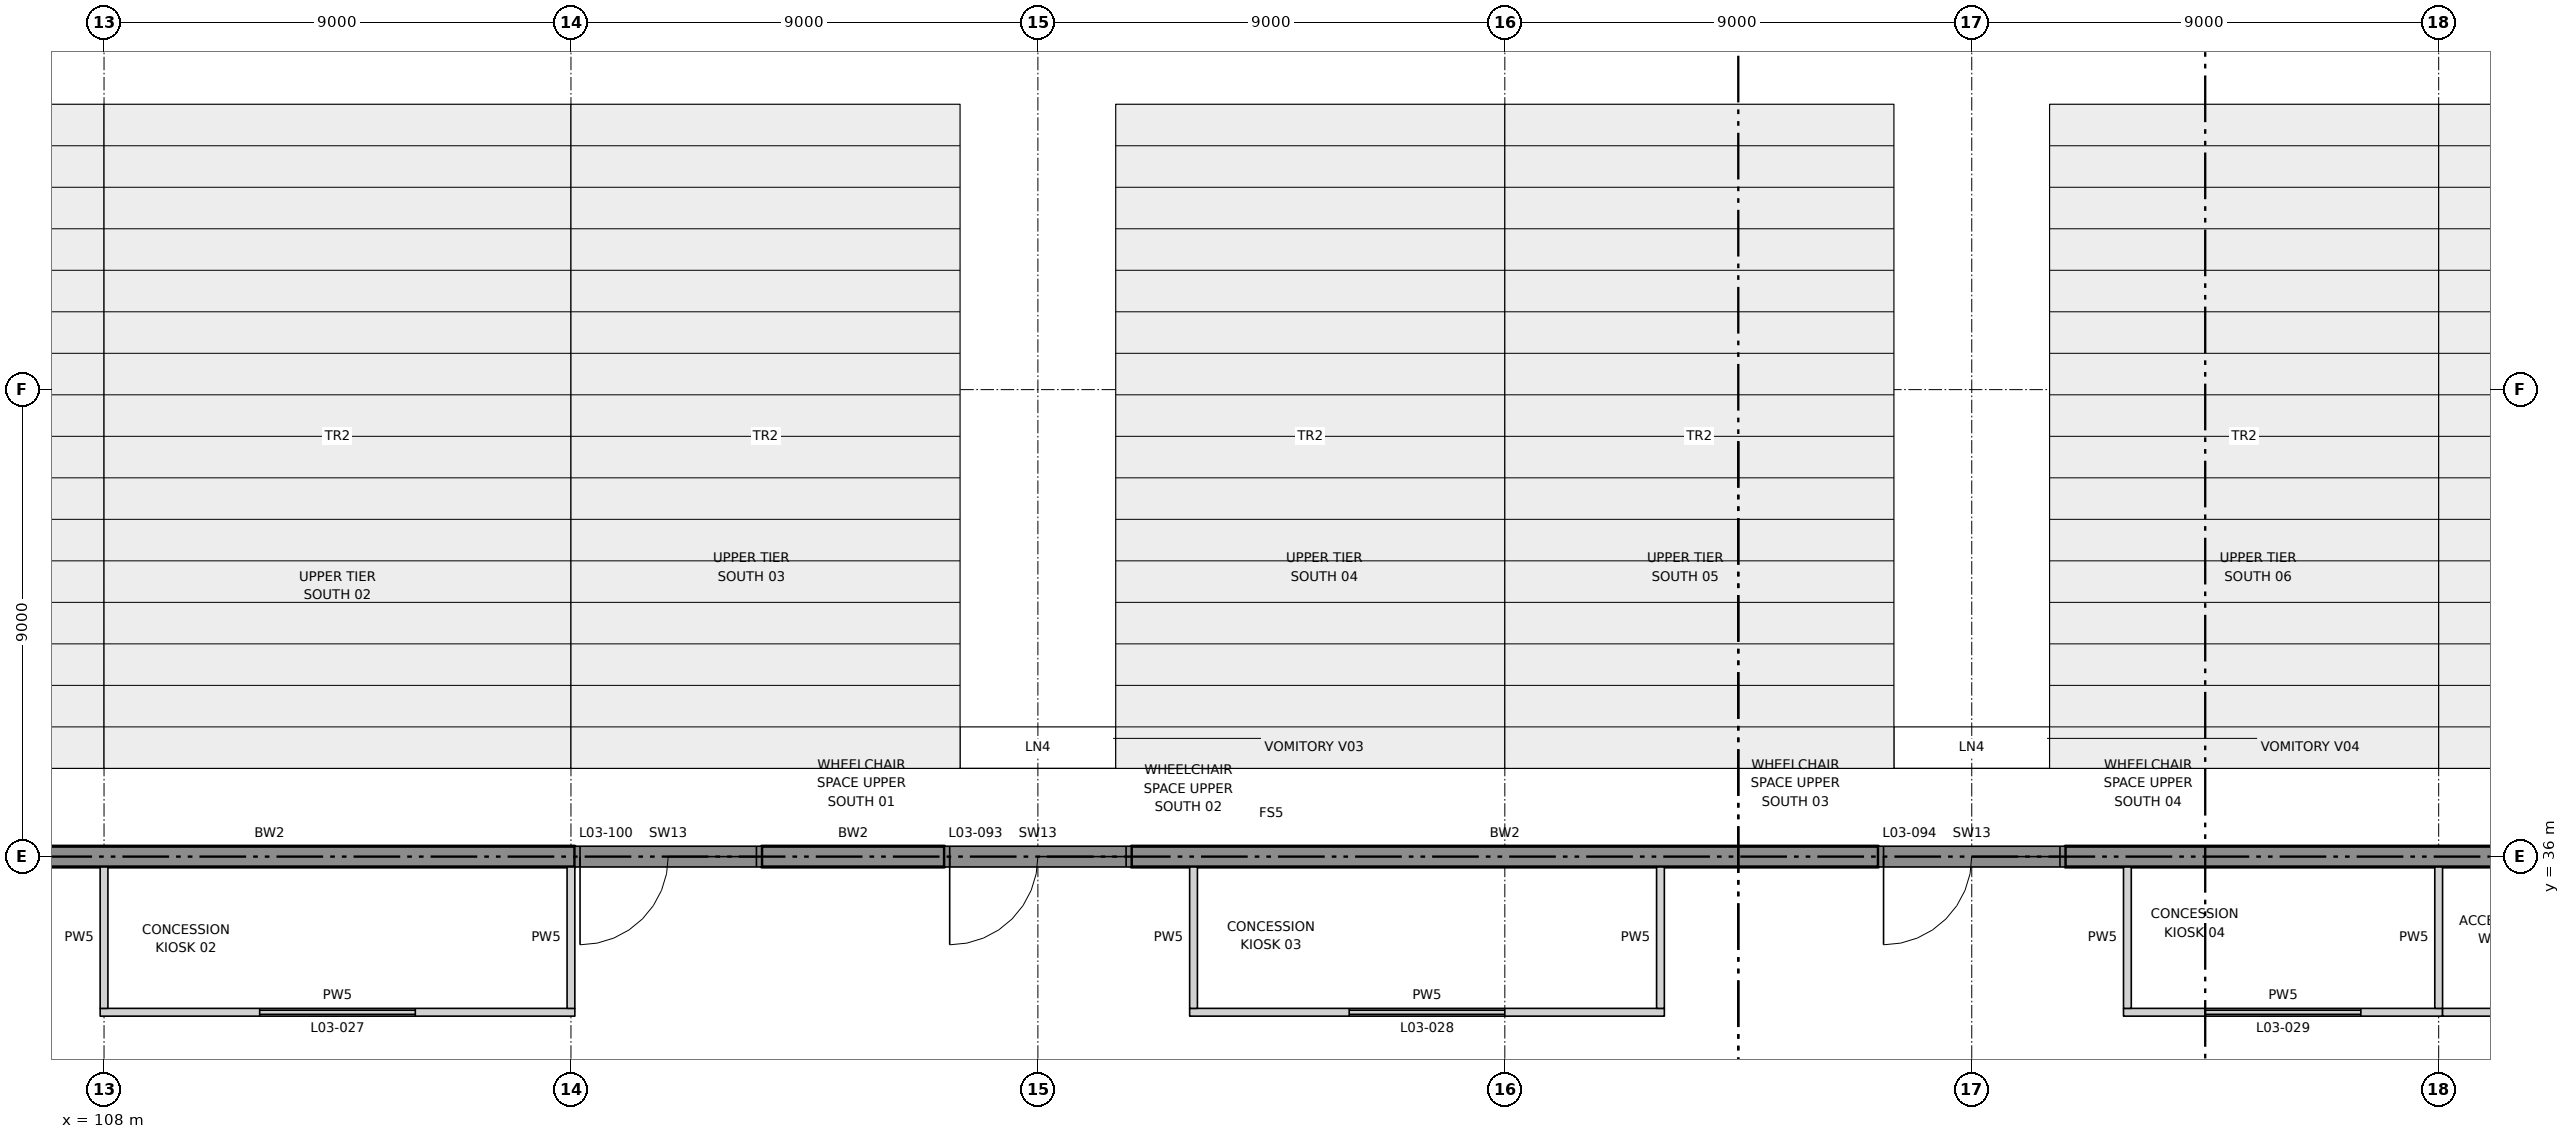
"""IFC4 building model, lengths in metres.
Left out: names, types, materials, properties, quantities, classifications, styles, units other than length and angle.
Written with IfcOpenShell. Run it as: python <this file> out.ifc"""

import sys

from ifc_helpers import new_model, si_unit, direction, frame, frame_2d, origin, place, context, subcontext, project, spatial, rectangle, extrude, element, fill, save


model = new_model("IFC4")
c1 = context("Model", 3, precision=1e-05, world=origin(), true_north=direction((0.0, 1.0)))
c2 = subcontext(c1, "Body", "Model", "MODEL_VIEW")
j1 = project(units=[si_unit("LENGTHUNIT", "METRE"), si_unit("PLANEANGLEUNIT", "RADIAN")], contexts=[c1])
p1 = place(None, origin())
s1 = spatial("IfcSite", under=j1, at=p1, CompositionType="ELEMENT")
p2 = place(p1, origin())
s2 = spatial("IfcBuilding", under=s1, at=p2, CompositionType="ELEMENT")
p3 = place(p2, frame((0.0, 0.0, 22.0)))
s3 = spatial("IfcBuildingStorey", under=s2, at=p3, CompositionType="ELEMENT", Elevation=22.0)
p4 = place(p3, frame((105.3, 36.0, 0.0), z_axis=(0.0, 0.0, 1.0), x_axis=(1.0, 0.0, 0.0)))
e1 = element("IfcWall", 1, at=p4, inside=s3, PredefinedType="SOLIDWALL", context=c2, shape_type="SweptSolid", body=[
    extrude(rectangle(XDim=11.775, YDim=0.4, at=frame_2d((5.887, 0.0))), origin(), (0.0, 0.0, 1.0), 6.0),
])
p5 = place(p3, frame((120.675, 36.0, 0.0), z_axis=(0.0, 0.0, 1.0), x_axis=(1.0, 0.0, 0.0)))
e2 = element("IfcWall", 2, at=p5, inside=s3, PredefinedType="SOLIDWALL", context=c2, shape_type="SweptSolid", body=[
    extrude(rectangle(XDim=3.525, YDim=0.4, at=frame_2d((1.762, 0.0))), origin(), (0.0, 0.0, 1.0), 6.0),
])
p6 = place(p3, frame((127.8, 36.0, 0.0), z_axis=(0.0, 0.0, 1.0), x_axis=(1.0, 0.0, 0.0)))
e3 = element("IfcWall", 3, at=p6, inside=s3, PredefinedType="SOLIDWALL", context=c2, shape_type="SweptSolid", body=[
    extrude(rectangle(XDim=14.4, YDim=0.4, at=frame_2d((7.2, 0.0))), origin(), (0.0, 0.0, 1.0), 6.0),
])
p7 = place(p3, frame((145.8, 36.0, 0.0), z_axis=(0.0, 0.0, 1.0), x_axis=(1.0, 0.0, 0.0)))
e4 = element("IfcWall", 4, at=p7, inside=s3, PredefinedType="SOLIDWALL", context=c2, shape_type="SweptSolid", body=[
    extrude(rectangle(XDim=25.2, YDim=0.4, at=frame_2d((12.6, 0.0))), origin(), (0.0, 0.0, 1.0), 6.0),
])
p8 = place(p3, frame((107.925, 33.0, 0.0), z_axis=(0.0, 0.0, 1.0), x_axis=(1.0, 0.0, 0.0)))
e5 = element("IfcWall", 5, at=p8, inside=s3, PredefinedType="PARTITIONING", context=c2, shape_type="SweptSolid", body=[
    extrude(rectangle(XDim=9.15, YDim=0.15, at=frame_2d((4.575, 0.0))), origin(), (0.0, 0.0, 1.0), 6.0),
])
p9 = place(p8, frame((3.075, 0.0, 0.0)))
e6 = element("IfcOpeningElement", 6, at=p9, cuts=e5, PredefinedType="OPENING", context=c2, shape_type="SweptSolid", body=[
    extrude(rectangle(XDim=3.0, YDim=2.4, at=frame_2d((1.5, 1.2))), frame((0.0, 0.085, 0.0), z_axis=(0.0, -1.0, 0.0), x_axis=(1.0, 0.0, 0.0)), (0.0, 0.0, 1.0), 0.17),
])
p10 = place(p3, frame((128.925, 33.0, 0.0), z_axis=(0.0, 0.0, 1.0), x_axis=(1.0, 0.0, 0.0)))
e7 = element("IfcWall", 7, at=p10, inside=s3, PredefinedType="PARTITIONING", context=c2, shape_type="SweptSolid", body=[
    extrude(rectangle(XDim=9.15, YDim=0.15, at=frame_2d((4.575, 0.0))), origin(), (0.0, 0.0, 1.0), 6.0),
])
p11 = place(p10, frame((3.075, 0.0, 0.0)))
e8 = element("IfcOpeningElement", 8, at=p11, cuts=e7, PredefinedType="OPENING", context=c2, shape_type="SweptSolid", body=[
    extrude(rectangle(XDim=3.0, YDim=2.4, at=frame_2d((1.5, 1.2))), frame((0.0, 0.085, 0.0), z_axis=(0.0, -1.0, 0.0), x_axis=(1.0, 0.0, 0.0)), (0.0, 0.0, 1.0), 0.17),
])
p12 = place(p3, frame((146.925, 33.0, 0.0), z_axis=(0.0, 0.0, 1.0), x_axis=(1.0, 0.0, 0.0)))
e9 = element("IfcWall", 9, at=p12, inside=s3, PredefinedType="PARTITIONING", context=c2, shape_type="SweptSolid", body=[
    extrude(rectangle(XDim=6.15, YDim=0.15, at=frame_2d((3.075, 0.0))), origin(), (0.0, 0.0, 1.0), 6.0),
])
p13 = place(p12, frame((1.575, 0.0, 0.0)))
e10 = element("IfcOpeningElement", 10, at=p13, cuts=e9, PredefinedType="OPENING", context=c2, shape_type="SweptSolid", body=[
    extrude(rectangle(XDim=3.0, YDim=2.4, at=frame_2d((1.5, 1.2))), frame((0.0, 0.085, 0.0), z_axis=(0.0, -1.0, 0.0), x_axis=(1.0, 0.0, 0.0)), (0.0, 0.0, 1.0), 0.17),
])
p14 = place(p3, frame((153.075, 33.0, 0.0), z_axis=(0.0, 0.0, 1.0), x_axis=(1.0, 0.0, 0.0)))
e11 = element("IfcWall", 11, at=p14, inside=s3, PredefinedType="PARTITIONING", context=c2, shape_type="SweptSolid", body=[
    extrude(rectangle(XDim=3.0, YDim=0.15, at=frame_2d((1.5, 0.0))), origin(), (0.0, 0.0, 1.0), 6.0),
])
p15 = place(p14, frame((1.0, 0.0, 0.0)))
e12 = element("IfcOpeningElement", 12, at=p15, cuts=e11, PredefinedType="OPENING", context=c2, shape_type="SweptSolid", body=[
    extrude(rectangle(XDim=1.0, YDim=2.1, at=frame_2d((0.5, 1.05))), frame((0.0, 0.085, 0.0), z_axis=(0.0, -1.0, 0.0), x_axis=(1.0, 0.0, 0.0)), (0.0, 0.0, 1.0), 0.17),
])
for number, where, z_axis, x_axis in (
    (13, (108.0, 33.075, 0.0), (0.0, 0.0, 1.0), (0.0, 1.0, 0.0)),
    (14, (117.0, 33.075, 0.0), (0.0, 0.0, 1.0), (0.0, 1.0, 0.0)),
):
    element("IfcWall", number, at=place(p3, frame(where, z_axis=z_axis, x_axis=x_axis)), inside=s3, PredefinedType="PARTITIONING", context=c2, shape_type="SweptSolid", body=[
        extrude(rectangle(XDim=2.725, YDim=0.15, at=frame_2d((1.363, 0.0))), origin(), (0.0, 0.0, 1.0), 4.7),
    ])
for number, where, z_axis, x_axis in (
    (15, (129.0, 33.075, 0.0), (0.0, 0.0, 1.0), (0.0, 1.0, 0.0)),
    (16, (138.0, 33.075, 0.0), (0.0, 0.0, 1.0), (0.0, 1.0, 0.0)),
    (17, (147.0, 33.075, 0.0), (0.0, 0.0, 1.0), (0.0, 1.0, 0.0)),
):
    element("IfcWall", number, at=place(p3, frame(where, z_axis=z_axis, x_axis=x_axis)), inside=s3, PredefinedType="PARTITIONING", context=c2, shape_type="SweptSolid", body=[
        extrude(rectangle(XDim=2.725, YDim=0.15, at=frame_2d((1.363, 0.0))), origin(), (0.0, 0.0, 1.0), 6.0),
    ])
p16 = place(p3, frame((153.0, 33.075, 0.0), z_axis=(0.0, 0.0, 1.0), x_axis=(0.0, 1.0, 0.0)))
e18 = element("IfcWall", 18, at=p16, inside=s3, PredefinedType="PARTITIONING", context=c2, shape_type="SweptSolid", body=[
    extrude(rectangle(XDim=2.725, YDim=0.15, at=frame_2d((1.363, 0.0))), origin(), (0.0, 0.0, 1.0), 4.7),
])
p17 = place(p3, frame((124.2, 36.0, 0.0), z_axis=(0.0, 0.0, 1.0), x_axis=(1.0, 0.0, 0.0)))
e19 = element("IfcWall", 19, at=p17, inside=s3, PredefinedType="SOLIDWALL", context=c2, shape_type="SweptSolid", body=[
    extrude(rectangle(XDim=3.6, YDim=0.4, at=frame_2d((1.8, 0.0))), origin(), (0.0, 0.0, 1.0), 3.0),
])
p18 = place(p17, frame((0.1, 0.0, 0.0)))
e20 = element("IfcOpeningElement", 20, at=p18, cuts=e19, PredefinedType="OPENING", context=c2, shape_type="SweptSolid", body=[
    extrude(rectangle(XDim=3.4, YDim=2.4, at=frame_2d((1.7, 1.2))), frame((0.0, 0.21, 0.0), z_axis=(0.0, -1.0, 0.0), x_axis=(1.0, 0.0, 0.0)), (0.0, 0.0, 1.0), 0.42),
])
p19 = place(p3, frame((142.2, 36.0, 0.0), z_axis=(0.0, 0.0, 1.0), x_axis=(1.0, 0.0, 0.0)))
e21 = element("IfcWall", 21, at=p19, inside=s3, PredefinedType="SOLIDWALL", context=c2, shape_type="SweptSolid", body=[
    extrude(rectangle(XDim=3.6, YDim=0.4, at=frame_2d((1.8, 0.0))), origin(), (0.0, 0.0, 1.0), 3.0),
])
p20 = place(p19, frame((0.1, 0.0, 0.0)))
e22 = element("IfcOpeningElement", 22, at=p20, cuts=e21, PredefinedType="OPENING", context=c2, shape_type="SweptSolid", body=[
    extrude(rectangle(XDim=3.4, YDim=2.4, at=frame_2d((1.7, 1.2))), frame((0.0, 0.21, 0.0), z_axis=(0.0, -1.0, 0.0), x_axis=(1.0, 0.0, 0.0)), (0.0, 0.0, 1.0), 0.42),
])
p21 = place(p3, frame((117.075, 36.0, 0.0), z_axis=(0.0, 0.0, 1.0), x_axis=(1.0, 0.0, 0.0)))
e23 = element("IfcWall", 23, at=p21, inside=s3, PredefinedType="SOLIDWALL", context=c2, shape_type="SweptSolid", body=[
    extrude(rectangle(XDim=3.6, YDim=0.4, at=frame_2d((1.8, 0.0))), origin(), (0.0, 0.0, 1.0), 3.0),
])
p22 = place(p21, frame((0.1, 0.0, 0.0)))
e24 = element("IfcOpeningElement", 24, at=p22, cuts=e23, PredefinedType="OPENING", context=c2, shape_type="SweptSolid", body=[
    extrude(rectangle(XDim=3.4, YDim=2.4, at=frame_2d((1.7, 1.2))), frame((0.0, 0.21, 0.0), z_axis=(0.0, -1.0, 0.0), x_axis=(1.0, 0.0, 0.0)), (0.0, 0.0, 1.0), 0.42),
])
p23 = place(p9, origin())
e25 = element("IfcDoor", 25, at=p23, inside=s3, OperationType="ROLLINGUP", PredefinedType="DOOR", context=c2, shape_type="SweptSolid", body=[
    extrude(rectangle(XDim=3.0, YDim=2.4, at=frame_2d((1.5, 1.2))), frame((0.0, 0.025, 0.0), z_axis=(0.0, -1.0, 0.0), x_axis=(1.0, 0.0, 0.0)), (0.0, 0.0, 1.0), 0.05),
])
fill(e6, e25)
p24 = place(p11, origin())
e26 = element("IfcDoor", 26, at=p24, inside=s3, OperationType="ROLLINGUP", PredefinedType="DOOR", context=c2, shape_type="SweptSolid", body=[
    extrude(rectangle(XDim=3.0, YDim=2.4, at=frame_2d((1.5, 1.2))), frame((0.0, 0.025, 0.0), z_axis=(0.0, -1.0, 0.0), x_axis=(1.0, 0.0, 0.0)), (0.0, 0.0, 1.0), 0.05),
])
fill(e8, e26)
p25 = place(p13, origin())
e27 = element("IfcDoor", 27, at=p25, inside=s3, OperationType="ROLLINGUP", PredefinedType="DOOR", context=c2, shape_type="SweptSolid", body=[
    extrude(rectangle(XDim=3.0, YDim=2.4, at=frame_2d((1.5, 1.2))), frame((0.0, 0.025, 0.0), z_axis=(0.0, -1.0, 0.0), x_axis=(1.0, 0.0, 0.0)), (0.0, 0.0, 1.0), 0.05),
])
fill(e10, e27)
p26 = place(p18, frame((3.4, 0.0, 0.0), z_axis=(0.0, 0.0, 1.0), x_axis=(-1.0, 0.0, 0.0)))
e28 = element("IfcDoor", 28, at=p26, inside=s3, OperationType="DOUBLE_DOOR_SINGLE_SWING", PredefinedType="DOOR", context=c2, shape_type="SweptSolid", body=[
    extrude(rectangle(XDim=3.4, YDim=2.4, at=frame_2d((1.7, 1.2))), frame((0.0, 0.025, 0.0), z_axis=(0.0, -1.0, 0.0), x_axis=(1.0, 0.0, 0.0)), (0.0, 0.0, 1.0), 0.05),
])
fill(e20, e28)
p27 = place(p20, frame((3.4, 0.0, 0.0), z_axis=(0.0, 0.0, 1.0), x_axis=(-1.0, 0.0, 0.0)))
e29 = element("IfcDoor", 29, at=p27, inside=s3, OperationType="DOUBLE_DOOR_SINGLE_SWING", PredefinedType="DOOR", context=c2, shape_type="SweptSolid", body=[
    extrude(rectangle(XDim=3.4, YDim=2.4, at=frame_2d((1.7, 1.2))), frame((0.0, 0.025, 0.0), z_axis=(0.0, -1.0, 0.0), x_axis=(1.0, 0.0, 0.0)), (0.0, 0.0, 1.0), 0.05),
])
fill(e22, e29)
p28 = place(p22, frame((3.4, 0.0, 0.0), z_axis=(0.0, 0.0, 1.0), x_axis=(-1.0, 0.0, 0.0)))
e30 = element("IfcDoor", 30, at=p28, inside=s3, OperationType="DOUBLE_DOOR_SINGLE_SWING", PredefinedType="DOOR", context=c2, shape_type="SweptSolid", body=[
    extrude(rectangle(XDim=3.4, YDim=2.4, at=frame_2d((1.7, 1.2))), frame((0.0, 0.025, 0.0), z_axis=(0.0, -1.0, 0.0), x_axis=(1.0, 0.0, 0.0)), (0.0, 0.0, 1.0), 0.05),
])
fill(e24, e30)
save(model, sys.argv[1])
